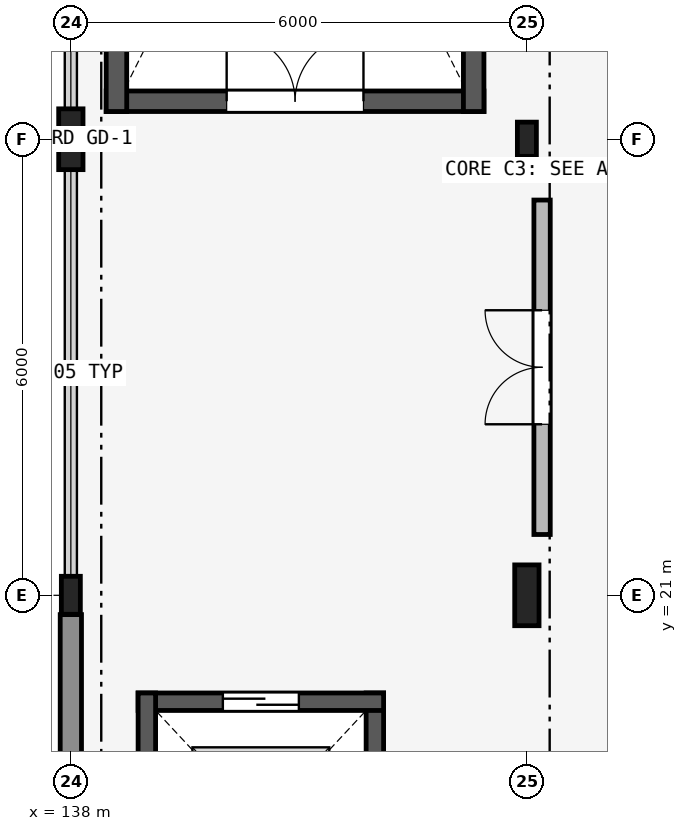
"""IFC4 building model, lengths in metres.
Left out: names, types, materials, properties, quantities, classifications, styles, units other than length and angle.
Written with IfcOpenShell. Run it as: python <this file> out.ifc"""

import sys

from ifc_helpers import new_model, si_unit, direction, frame, frame_2d, origin, origin_2d, place, context, subcontext, project, spatial, rectangle, i_section, extrude, element, fill, save


model = new_model("IFC4")
c1 = context("Model", 3, precision=1e-05, world=origin(), true_north=direction((0.0, 1.0)))
c2 = subcontext(c1, "Body", "Model", "MODEL_VIEW")
j1 = project(units=[si_unit("LENGTHUNIT", "METRE"), si_unit("PLANEANGLEUNIT", "RADIAN")], contexts=[c1])
p1 = place(None, origin())
s1 = spatial("IfcSite", under=j1, at=p1, CompositionType="ELEMENT")
p2 = place(p1, origin())
s2 = spatial("IfcBuilding", under=s1, at=p2, CompositionType="ELEMENT")
p3 = place(p2, frame((0.0, 0.0, 18.0)))
s3 = spatial("IfcBuildingStorey", under=s2, at=p3, CompositionType="ELEMENT", Elevation=18.0)
p4 = place(p3, frame((138.0, 21.0, 0.0), z_axis=(0.0, 0.0, 1.0), x_axis=(1.0, 0.0, 0.0)))
e1 = element("IfcColumn", 1, at=p4, inside=s3, PredefinedType="COLUMN", context=c2, shape_type="SweptSolid", body=[
    extrude(i_section(OverallWidth=0.25, OverallDepth=0.5, WebThickness=0.01, FlangeThickness=0.015, FilletRadius=0.015, at=origin_2d()), origin(), (0.0, 0.0, 1.0), 4.2),
])
for number, where, z_axis, x_axis in (
    (2, (138.0, 27.0, 0.0), (0.0, 0.0, 1.0), (1.0, 0.0, 0.0)),
    (3, (144.0, 21.0, 0.0), (0.0, 0.0, 1.0), (1.0, 0.0, 0.0)),
):
    element("IfcColumn", number, at=place(p3, frame(where, z_axis=z_axis, x_axis=x_axis)), inside=s3, PredefinedType="COLUMN", context=c2, shape_type="SweptSolid", body=[
        extrude(i_section(OverallWidth=0.32, OverallDepth=0.8, WebThickness=0.016, FlangeThickness=0.028, at=origin_2d()), origin(), (0.0, 0.0, 1.0), 4.2),
    ])
p5 = place(p3, frame((144.0, 27.0, 0.0), z_axis=(0.0, 0.0, 1.0), x_axis=(1.0, 0.0, 0.0)))
e4 = element("IfcColumn", 4, at=p5, inside=s3, PredefinedType="COLUMN", context=c2, shape_type="SweptSolid", body=[
    extrude(i_section(OverallWidth=0.25, OverallDepth=0.45, WebThickness=0.011, FlangeThickness=0.014, FilletRadius=0.015, at=origin_2d()), origin(), (0.0, 0.0, 1.0), 4.2),
])
p6 = place(p3, frame((138.0, 15.229, 0.0), z_axis=(0.0, 0.0, 1.0), x_axis=(0.0, 1.0, 0.0)))
e5 = element("IfcWall", 5, at=p6, inside=s3, PredefinedType="SOLIDWALL", context=c2, shape_type="SweptSolid", body=[
    extrude(rectangle(XDim=5.517, YDim=0.28, at=frame_2d((2.759, 0.0))), origin(), (0.0, 0.0, 1.0), 3.34),
])
p7 = place(p3, frame((138.465, 27.5, 0.0), z_axis=(0.0, 0.0, 1.0), x_axis=(1.0, 0.0, 0.0)))
e6 = element("IfcWall", 6, at=p7, inside=s3, PredefinedType="SHEAR", context=c2, shape_type="SweptSolid", body=[
    extrude(rectangle(XDim=4.97, YDim=0.27, at=frame_2d((2.485, 0.0))), origin(), (0.0, 0.0, 1.0), 4.06),
])
p8 = place(p7, frame((1.585, 0.0, 0.0)))
e7 = element("IfcOpeningElement", 7, at=p8, cuts=e6, PredefinedType="OPENING", context=c2, shape_type="SweptSolid", body=[
    extrude(rectangle(XDim=1.8, YDim=2.2, at=frame_2d((0.9, 1.1))), frame((0.0, 0.145, 0.0), z_axis=(0.0, -1.0, 0.0), x_axis=(1.0, 0.0, 0.0)), (0.0, 0.0, 1.0), 0.29),
])
for number, where, z_axis, x_axis in (
    (8, (143.3, 27.365, 0.0), (0.0, 0.0, 1.0), (0.0, 1.0, 0.0)),
    (9, (138.6, 36.935, 0.0), (0.0, 0.0, 1.0), (0.0, -1.0, 0.0)),
):
    element("IfcWall", number, at=place(p3, frame(where, z_axis=z_axis, x_axis=x_axis)), inside=s3, PredefinedType="SHEAR", context=c2, shape_type="SweptSolid", body=[
        extrude(rectangle(XDim=9.57, YDim=0.27, at=frame_2d((4.785, 0.0))), origin(), (0.0, 0.0, 1.0), 4.06),
    ])
p9 = place(p3, frame((144.2, 21.8, 0.0), z_axis=(0.0, 0.0, 1.0), x_axis=(0.0, 1.0, 0.0)))
e10 = element("IfcWall", 10, at=p9, inside=s3, PredefinedType="PARTITIONING", context=c2, shape_type="SweptSolid", body=[
    extrude(rectangle(XDim=4.4, YDim=0.215, at=frame_2d((2.2, 0.0))), origin(), (0.0, 0.0, 1.0), 3.484),
])
p10 = place(p9, frame((1.45, 0.0, 0.0)))
e11 = element("IfcOpeningElement", 11, at=p10, cuts=e10, PredefinedType="OPENING", context=c2, shape_type="SweptSolid", body=[
    extrude(rectangle(XDim=1.5, YDim=2.15, at=frame_2d((0.75, 1.075))), frame((0.0, 0.117, 0.0), z_axis=(0.0, -1.0, 0.0), x_axis=(1.0, 0.0, 0.0)), (0.0, 0.0, 1.0), 0.235),
])
p11 = place(p3, frame((142.0, 16.285, 0.0), z_axis=(0.0, 0.0, 1.0), x_axis=(0.0, 1.0, 0.0)))
e12 = element("IfcWall", 12, at=p11, inside=s3, PredefinedType="SHEAR", context=c2, shape_type="SweptSolid", body=[
    extrude(rectangle(XDim=3.43, YDim=0.23, at=frame_2d((1.715, 0.0))), origin(), (0.0, 0.0, 1.0), 4.2),
])
p12 = place(p3, frame((142.115, 19.6, 0.0), z_axis=(0.0, 0.0, 1.0), x_axis=(-1.0, 0.0, 0.0)))
e13 = element("IfcWall", 13, at=p12, inside=s3, PredefinedType="SHEAR", context=c2, shape_type="SweptSolid", body=[
    extrude(rectangle(XDim=3.23, YDim=0.23, at=frame_2d((1.615, 0.0))), origin(), (0.0, 0.0, 1.0), 4.2),
])
p13 = place(p12, frame((1.115, 0.0, 0.0)))
e14 = element("IfcOpeningElement", 14, at=p13, cuts=e13, PredefinedType="OPENING", context=c2, shape_type="SweptSolid", body=[
    extrude(rectangle(XDim=1.0, YDim=2.15, at=frame_2d((0.5, 1.075))), frame((0.0, 0.125, 0.0), z_axis=(0.0, -1.0, 0.0), x_axis=(1.0, 0.0, 0.0)), (0.0, 0.0, 1.0), 0.25),
])
p14 = place(p3, frame((139.0, 19.715, 0.0), z_axis=(0.0, 0.0, 1.0), x_axis=(0.0, -1.0, 0.0)))
e15 = element("IfcWall", 15, at=p14, inside=s3, PredefinedType="SHEAR", context=c2, shape_type="SweptSolid", body=[
    extrude(rectangle(XDim=3.43, YDim=0.23, at=frame_2d((1.715, 0.0))), origin(), (0.0, 0.0, 1.0), 4.2),
])
p15 = place(p8, origin())
e16 = element("IfcDoor", 16, at=p15, inside=s3, OperationType="DOUBLE_DOOR_SINGLE_SWING", PredefinedType="DOOR", context=c2, shape_type="SweptSolid", body=[
    extrude(rectangle(XDim=1.8, YDim=2.2, at=frame_2d((0.9, 1.1))), frame((0.0, 0.025, 0.0), z_axis=(0.0, -1.0, 0.0), x_axis=(1.0, 0.0, 0.0)), (0.0, 0.0, 1.0), 0.05),
])
fill(e7, e16)
p16 = place(p10, origin())
e17 = element("IfcDoor", 17, at=p16, inside=s3, OperationType="DOUBLE_DOOR_SINGLE_SWING", PredefinedType="DOOR", context=c2, shape_type="SweptSolid", body=[
    extrude(rectangle(XDim=1.5, YDim=2.15, at=frame_2d((0.75, 1.075))), frame((0.0, 0.025, 0.0), z_axis=(0.0, -1.0, 0.0), x_axis=(1.0, 0.0, 0.0)), (0.0, 0.0, 1.0), 0.05),
])
fill(e11, e17)
p17 = place(p13, origin())
e18 = element("IfcDoor", 18, at=p17, inside=s3, OperationType="SLIDING_TO_LEFT", PredefinedType="DOOR", context=c2, shape_type="SweptSolid", body=[
    extrude(rectangle(XDim=1.0, YDim=2.15, at=frame_2d((0.5, 1.075))), frame((0.0, 0.025, 0.0), z_axis=(0.0, -1.0, 0.0), x_axis=(1.0, 0.0, 0.0)), (0.0, 0.0, 1.0), 0.05),
])
fill(e14, e18)
save(model, sys.argv[1])
